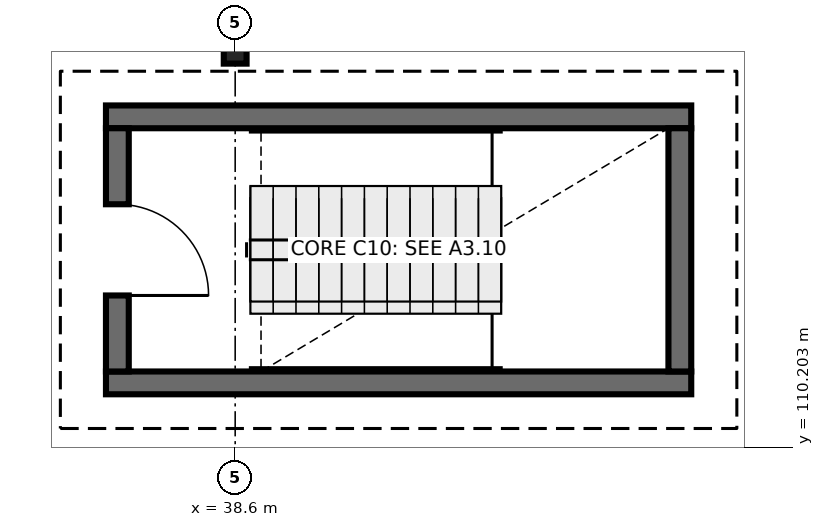
"""IFC4 building model, lengths in metres.
Left out: names, types, materials, properties, quantities, classifications, styles, units other than length and angle.
Written with IfcOpenShell. Run it as: python <this file> out.ifc"""

import sys

from ifc_helpers import new_model, si_unit, direction, frame, frame_2d, origin, origin_2d, place, context, subcontext, project, spatial, rectangle, i_section, extrude, element, fill, save


model = new_model("IFC4")
c1 = context("Model", 3, precision=1e-05, world=origin(), true_north=direction((0.0, 1.0)))
c2 = subcontext(c1, "Body", "Model", "MODEL_VIEW")
j1 = project(units=[si_unit("LENGTHUNIT", "METRE"), si_unit("PLANEANGLEUNIT", "RADIAN")], contexts=[c1])
p1 = place(None, origin())
s1 = spatial("IfcSite", under=j1, at=p1, CompositionType="ELEMENT")
p2 = place(p1, origin())
s2 = spatial("IfcBuilding", under=s1, at=p2, CompositionType="ELEMENT")
p3 = place(p2, frame((0.0, 0.0, 4.8)))
s3 = spatial("IfcBuildingStorey", under=s2, at=p3, CompositionType="ELEMENT", Elevation=4.8)
p4 = place(p3, frame((38.6, 115.5, 0.0), z_axis=(0.0, 0.0, 1.0), x_axis=(1.0, 0.0, 0.0)))
e1 = element("IfcColumn", 1, at=p4, inside=s3, PredefinedType="COLUMN", context=c2, shape_type="SweptSolid", body=[
    extrude(i_section(OverallWidth=0.3, OverallDepth=0.5, WebThickness=0.014, FlangeThickness=0.028, FilletRadius=0.027, at=origin_2d()), origin(), (0.0, 0.0, 1.0), 4.5),
])
for number, where, z_axis, x_axis in (
    (2, (36.9, 111.05, 0.0), (0.0, 0.0, 1.0), (1.0, 0.0, 0.0)),
    (3, (44.6, 114.55, 0.0), (0.0, 0.0, 1.0), (-1.0, 0.0, 0.0)),
):
    element("IfcWall", number, at=place(p3, frame(where, z_axis=z_axis, x_axis=x_axis)), inside=s3, PredefinedType="SHEAR", context=c2, shape_type="SweptSolid", body=[
        extrude(rectangle(XDim=7.7, YDim=0.3, at=frame_2d((3.85, 0.0))), origin(), (0.0, 0.0, 1.0), 4.5),
    ])
p5 = place(p3, frame((37.05, 114.4, 0.0), z_axis=(0.0, 0.0, 1.0), x_axis=(0.0, -1.0, 0.0)))
e4 = element("IfcWall", 4, at=p5, inside=s3, PredefinedType="SHEAR", context=c2, shape_type="SweptSolid", body=[
    extrude(rectangle(XDim=3.2, YDim=0.3, at=frame_2d((1.6, 0.0))), origin(), (0.0, 0.0, 1.0), 4.5),
])
p6 = place(p5, frame((1.0, 0.0, 0.0)))
e5 = element("IfcOpeningElement", 5, at=p6, cuts=e4, PredefinedType="OPENING", context=c2, shape_type="SweptSolid", body=[
    extrude(rectangle(XDim=1.2, YDim=2.15, at=frame_2d((0.6, 1.075))), frame((0.0, 0.16, 0.0), z_axis=(0.0, -1.0, 0.0), x_axis=(1.0, 0.0, 0.0)), (0.0, 0.0, 1.0), 0.32),
])
p7 = place(p3, frame((44.45, 111.2, 0.0), z_axis=(0.0, 0.0, 1.0), x_axis=(0.0, 1.0, 0.0)))
e6 = element("IfcWall", 6, at=p7, inside=s3, PredefinedType="SHEAR", context=c2, shape_type="SweptSolid", body=[
    extrude(rectangle(XDim=3.2, YDim=0.3, at=frame_2d((1.6, 0.0))), origin(), (0.0, 0.0, 1.0), 4.5),
])
p8 = place(p6, origin())
e7 = element("IfcDoor", 7, at=p8, inside=s3, OperationType="SINGLE_SWING_RIGHT", PredefinedType="DOOR", context=c2, shape_type="SweptSolid", body=[
    extrude(rectangle(XDim=1.2, YDim=2.15, at=frame_2d((0.6, 1.075))), frame((0.0, 0.025, 0.0), z_axis=(0.0, -1.0, 0.0), x_axis=(1.0, 0.0, 0.0)), (0.0, 0.0, 1.0), 0.05),
])
fill(e5, e7)
save(model, sys.argv[1])
